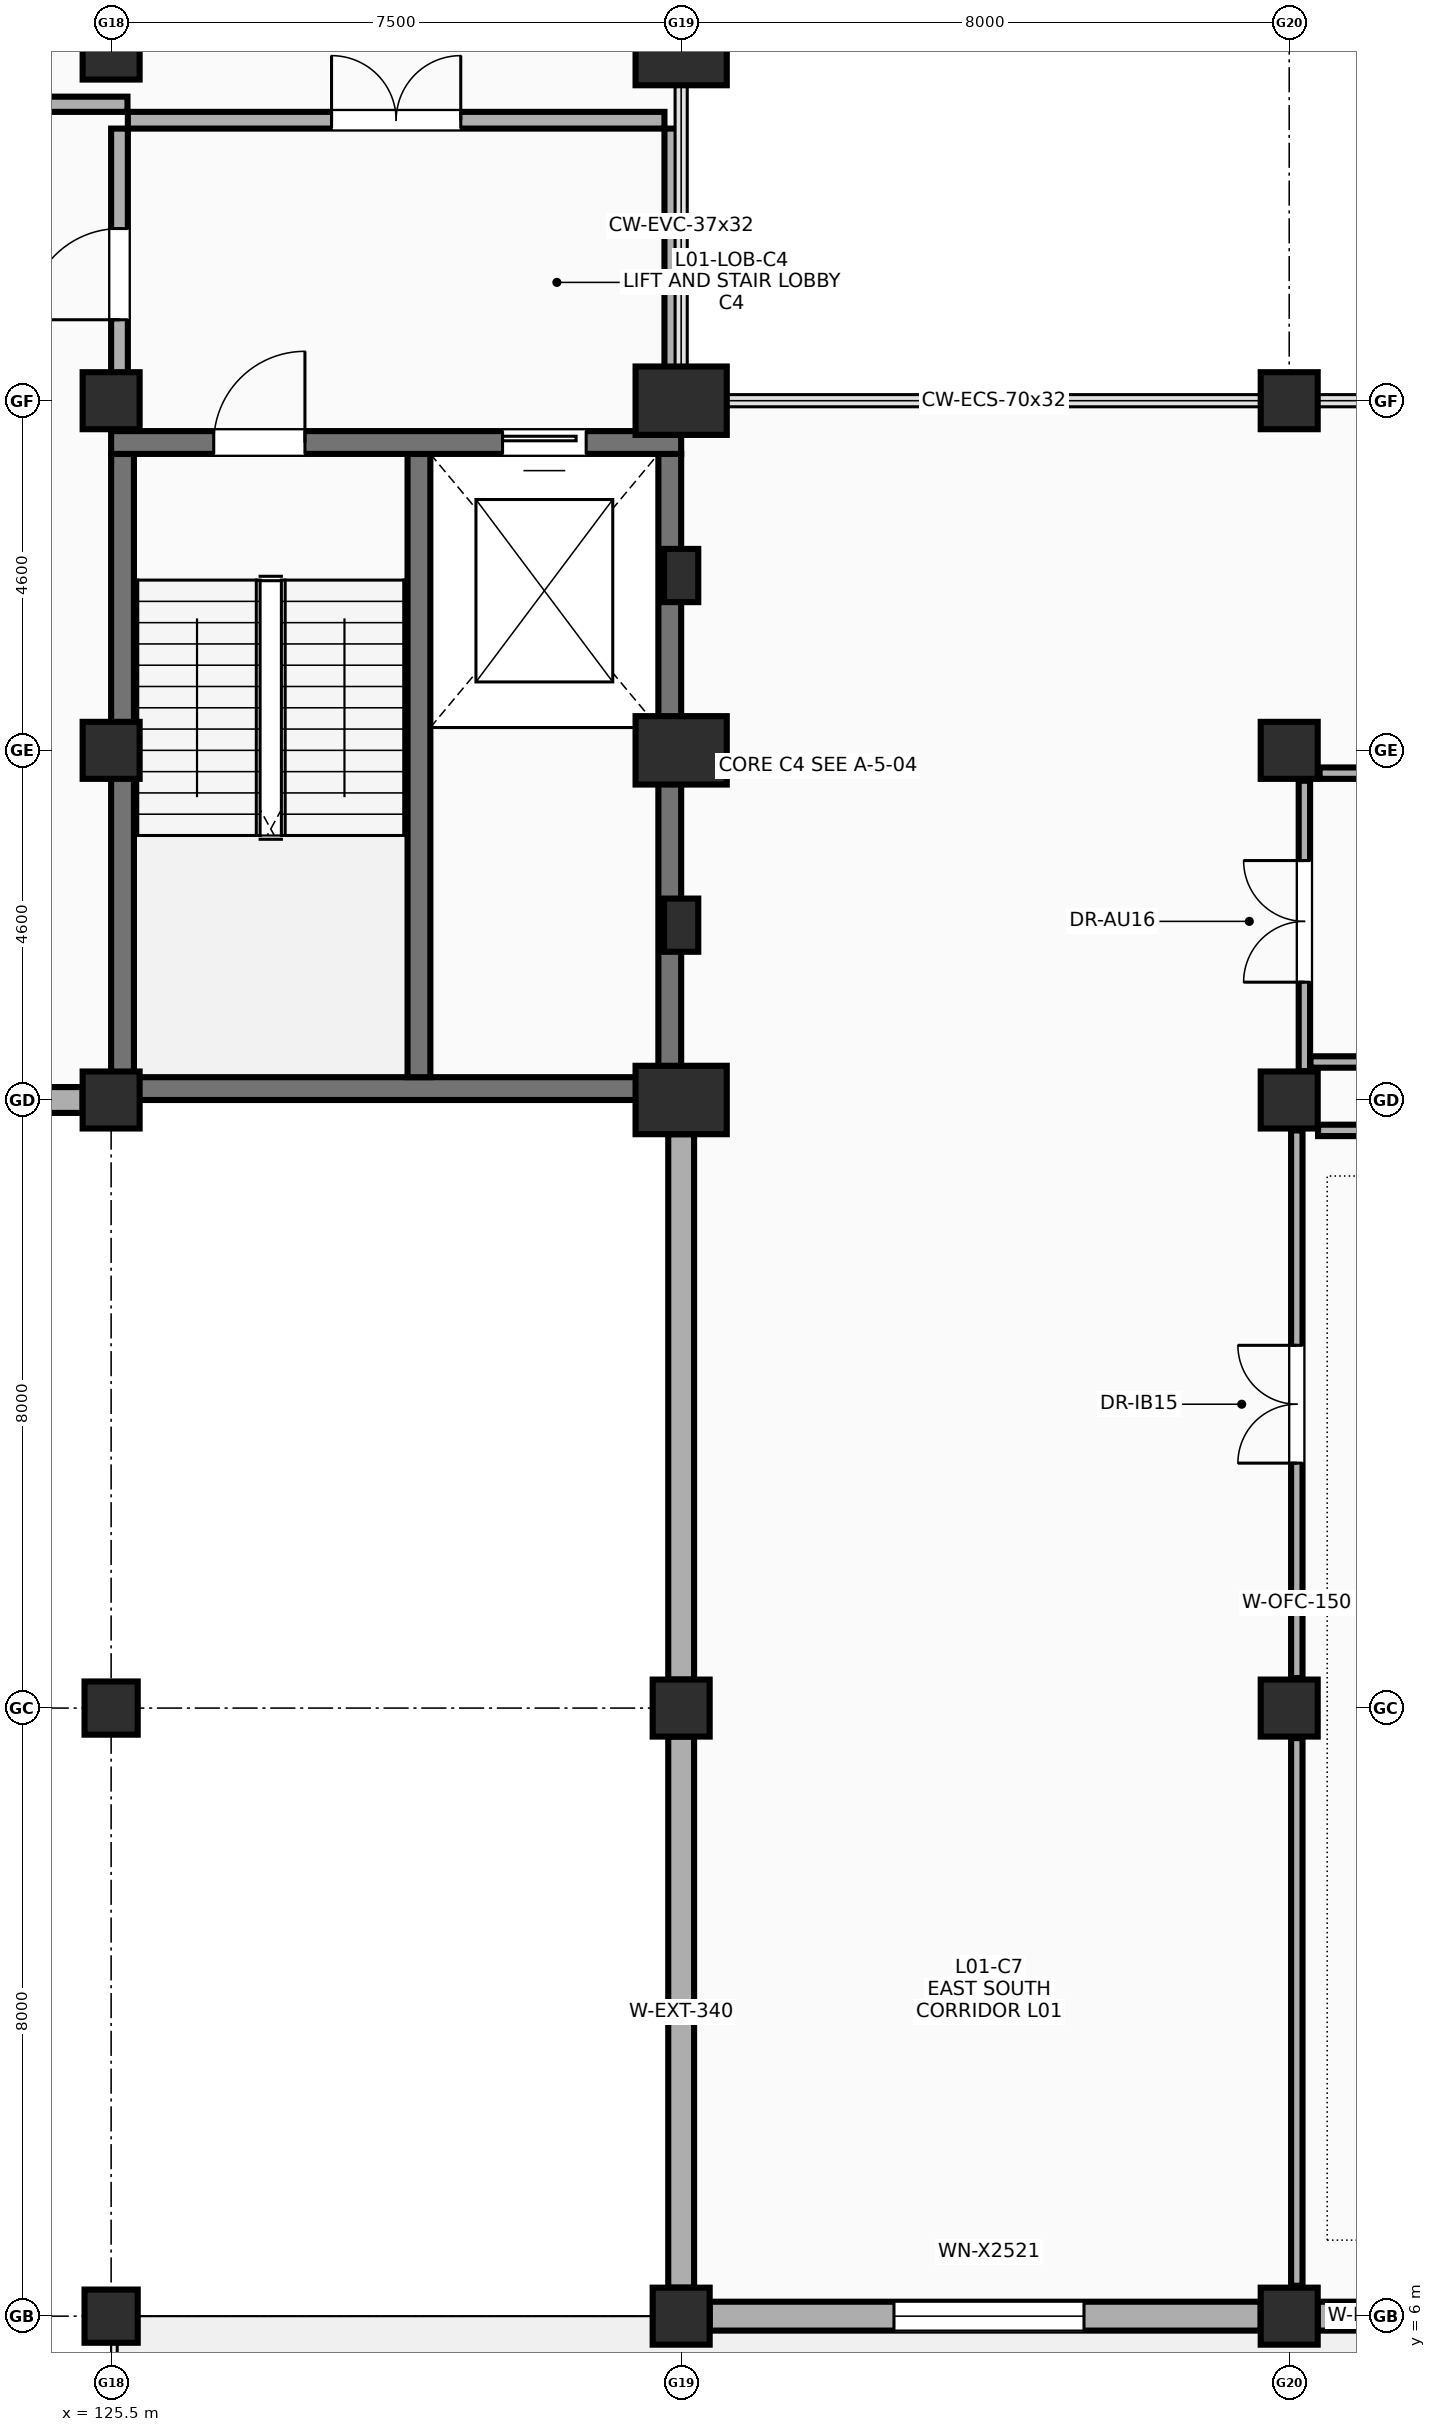
"""IFC4 building model, lengths in metres.
Left out: names, types, materials, properties, quantities, classifications, styles, units other than length and angle.
Written with IfcOpenShell. Run it as: python <this file> out.ifc"""

import sys

from ifc_helpers import new_model, si_unit, direction, frame, frame_2d, origin, origin_2d, place, context, subcontext, project, spatial, rectangle, circle, extrude, element, fill, save


model = new_model("IFC4")
c1 = context("Model", 3, precision=1e-05, world=origin(), true_north=direction((0.0, 1.0)))
c2 = subcontext(c1, "Body", "Model", "MODEL_VIEW")
j1 = project(units=[si_unit("LENGTHUNIT", "METRE"), si_unit("PLANEANGLEUNIT", "RADIAN")], contexts=[c1])
p1 = place(None, origin())
s1 = spatial("IfcSite", under=j1, at=p1, CompositionType="ELEMENT")
p2 = place(p1, origin())
s2 = spatial("IfcBuilding", under=s1, at=p2, CompositionType="ELEMENT")
p3 = place(p2, frame((0.0, 0.0, 5.4)))
s3 = spatial("IfcBuildingStorey", under=s2, at=p3, CompositionType="ELEMENT", Elevation=5.4)
for number, where, z_axis, x_axis in (
    (1, (125.5, 6.0, 0.0), (0.0, 0.0, 1.0), (1.0, 0.0, 0.0)),
    (2, (125.5, 14.0, 0.0), (0.0, 0.0, 1.0), (1.0, 0.0, 0.0)),
):
    element("IfcColumn", number, at=place(p3, frame(where, z_axis=z_axis, x_axis=x_axis)), inside=s3, PredefinedType="COLUMN", context=c2, shape_type="SweptSolid", body=[
        extrude(circle(Radius=0.35, at=origin_2d()), origin(), (0.0, 0.0, 1.0), 4.4),
    ])
for number, where, z_axis, x_axis in (
    (3, (125.5, 22.0, 0.0), (0.0, 0.0, 1.0), (1.0, 0.0, 0.0)),
    (4, (125.5, 26.6, 0.0), (0.0, 0.0, 1.0), (1.0, 0.0, 0.0)),
    (5, (125.5, 31.2, 0.0), (0.0, 0.0, 1.0), (1.0, 0.0, 0.0)),
    (6, (125.5, 35.8, 0.0), (0.0, 0.0, 1.0), (1.0, 0.0, 0.0)),
    (7, (133.0, 6.0, 0.0), (0.0, 0.0, 1.0), (1.0, 0.0, 0.0)),
    (8, (133.0, 14.0, 0.0), (0.0, 0.0, 1.0), (1.0, 0.0, 0.0)),
):
    element("IfcColumn", number, at=place(p3, frame(where, z_axis=z_axis, x_axis=x_axis)), inside=s3, PredefinedType="COLUMN", context=c2, shape_type="SweptSolid", body=[
        extrude(rectangle(XDim=0.75, YDim=0.75, at=origin_2d()), origin(), (0.0, 0.0, 1.0), 4.4),
    ])
for number, where, z_axis, x_axis in (
    (9, (133.0, 22.0, 0.0), (0.0, 0.0, 1.0), (1.0, 0.0, 0.0)),
    (10, (133.0, 26.6, 0.0), (0.0, 0.0, 1.0), (1.0, 0.0, 0.0)),
    (11, (133.0, 31.2, 0.0), (0.0, 0.0, 1.0), (1.0, 0.0, 0.0)),
    (12, (133.0, 35.8, 0.0), (0.0, 0.0, 1.0), (1.0, 0.0, 0.0)),
):
    element("IfcColumn", number, at=place(p3, frame(where, z_axis=z_axis, x_axis=x_axis)), inside=s3, PredefinedType="COLUMN", context=c2, shape_type="SweptSolid", body=[
        extrude(rectangle(XDim=1.2, YDim=0.9, at=origin_2d()), origin(), (0.0, 0.0, 1.0), 4.4),
    ])
for number, where, z_axis, x_axis in (
    (13, (141.0, 6.0, 0.0), (0.0, 0.0, 1.0), (1.0, 0.0, 0.0)),
    (14, (141.0, 14.0, 0.0), (0.0, 0.0, 1.0), (1.0, 0.0, 0.0)),
    (15, (141.0, 22.0, 0.0), (0.0, 0.0, 1.0), (1.0, 0.0, 0.0)),
    (16, (141.0, 26.6, 0.0), (0.0, 0.0, 1.0), (1.0, 0.0, 0.0)),
    (17, (141.0, 31.2, 0.0), (0.0, 0.0, 1.0), (1.0, 0.0, 0.0)),
):
    element("IfcColumn", number, at=place(p3, frame(where, z_axis=z_axis, x_axis=x_axis)), inside=s3, PredefinedType="COLUMN", context=c2, shape_type="SweptSolid", body=[
        extrude(rectangle(XDim=0.75, YDim=0.75, at=origin_2d()), origin(), (0.0, 0.0, 1.0), 4.4),
    ])
for number, where, z_axis, x_axis in (
    (18, (133.0, 24.3, 0.0), (0.0, 0.0, 1.0), (1.0, 0.0, 0.0)),
    (19, (133.0, 28.9, 0.0), (0.0, 0.0, 1.0), (1.0, 0.0, 0.0)),
):
    element("IfcColumn", number, at=place(p3, frame(where, z_axis=z_axis, x_axis=x_axis)), inside=s3, PredefinedType="PILASTER", context=c2, shape_type="SweptSolid", body=[
        extrude(rectangle(XDim=0.45, YDim=0.7, at=origin_2d()), origin(), (0.0, 0.0, 1.0), 4.4),
    ])
p4 = place(p3, frame((125.5, 22.15, 0.0), z_axis=(0.0, 0.0, 1.0), x_axis=(1.0, 0.0, 0.0)))
e20 = element("IfcWall", 20, at=p4, inside=s3, PredefinedType="SHEAR", context=c2, shape_type="SweptSolid", body=[
    extrude(rectangle(XDim=7.5, YDim=0.3, at=frame_2d((3.75, 0.0))), origin(), (0.0, 0.0, 1.0), 4.4),
])
for number, where, z_axis, x_axis in (
    (21, (125.65, 22.3, 0.0), (0.0, 0.0, 1.0), (0.0, 1.0, 0.0)),
    (22, (132.85, 22.3, 0.0), (0.0, 0.0, 1.0), (0.0, 1.0, 0.0)),
    (23, (129.55, 22.3, 0.0), (0.0, 0.0, 1.0), (0.0, 1.0, 0.0)),
):
    element("IfcWall", number, at=place(p3, frame(where, z_axis=z_axis, x_axis=x_axis)), inside=s3, PredefinedType="SHEAR", context=c2, shape_type="SweptSolid", body=[
        extrude(rectangle(XDim=8.2, YDim=0.3, at=frame_2d((4.1, 0.0))), origin(), (0.0, 0.0, 1.0), 4.4),
    ])
p5 = place(p3, frame((133.375, 6.0, 0.0), z_axis=(0.0, 0.0, 1.0), x_axis=(1.0, 0.0, 0.0)))
e24 = element("IfcWall", 24, at=p5, inside=s3, PredefinedType="SOLIDWALL", context=c2, shape_type="SweptSolid", body=[
    extrude(rectangle(XDim=7.25, YDim=0.38, at=frame_2d((3.625, 0.0))), origin(), (0.0, 0.0, 1.0), 3.2),
])
p6 = place(p5, frame((2.425, 0.0, 0.85)))
e25 = element("IfcOpeningElement", 25, at=p6, cuts=e24, PredefinedType="OPENING", context=c2, shape_type="SweptSolid", body=[
    extrude(rectangle(XDim=2.5, YDim=2.1, at=frame_2d((1.25, 1.05))), frame((0.0, 0.2, 0.0), z_axis=(0.0, -1.0, 0.0), x_axis=(1.0, 0.0, 0.0)), (0.0, 0.0, 1.0), 0.4),
])
p7 = place(p3, frame((141.375, 6.0, 0.0), z_axis=(0.0, 0.0, 1.0), x_axis=(1.0, 0.0, 0.0)))
e26 = element("IfcWall", 26, at=p7, inside=s3, PredefinedType="SOLIDWALL", context=c2, shape_type="SweptSolid", body=[
    extrude(rectangle(XDim=7.75, YDim=0.38, at=frame_2d((3.875, 0.0))), origin(), (0.0, 0.0, 1.0), 3.2),
])
p8 = place(p7, frame((4.675, 0.0, 0.0), z_axis=(0.0, 0.0, 1.0), x_axis=(-1.0, 0.0, 0.0)))
e27 = element("IfcOpeningElement", 27, at=p8, cuts=e26, PredefinedType="OPENING", context=c2, shape_type="SweptSolid", body=[
    extrude(rectangle(XDim=1.6, YDim=2.3, at=frame_2d((0.8, 1.15))), frame((0.0, 0.2, 0.0), z_axis=(0.0, -1.0, 0.0), x_axis=(1.0, 0.0, 0.0)), (0.0, 0.0, 1.0), 0.4),
])
p9 = place(p3, frame((133.0, 6.375, 0.0), z_axis=(0.0, 0.0, 1.0), x_axis=(0.0, 1.0, 0.0)))
e28 = element("IfcWall", 28, at=p9, inside=s3, PredefinedType="SOLIDWALL", context=c2, shape_type="SweptSolid", body=[
    extrude(rectangle(XDim=7.25, YDim=0.34, at=frame_2d((3.625, 0.0))), origin(), (0.0, 0.0, 1.0), 3.2),
])
p10 = place(p3, frame((133.0, 14.375, 0.0), z_axis=(0.0, 0.0, 1.0), x_axis=(0.0, 1.0, 0.0)))
e29 = element("IfcWall", 29, at=p10, inside=s3, PredefinedType="SOLIDWALL", context=c2, shape_type="SweptSolid", body=[
    extrude(rectangle(XDim=7.175, YDim=0.34, at=frame_2d((3.587, 0.0))), origin(), (0.0, 0.0, 1.0), 3.2),
])
p11 = place(p3, frame((125.5, 30.65, 0.0), z_axis=(0.0, 0.0, 1.0), x_axis=(1.0, 0.0, 0.0)))
e30 = element("IfcWall", 30, at=p11, inside=s3, PredefinedType="SHEAR", context=c2, shape_type="SweptSolid", body=[
    extrude(rectangle(XDim=7.5, YDim=0.3, at=frame_2d((3.75, 0.0))), origin(), (0.0, 0.0, 1.0), 4.4),
])
p12 = place(p11, frame((1.35, 0.0, 0.0)))
e31 = element("IfcOpeningElement", 31, at=p12, cuts=e30, PredefinedType="OPENING", context=c2, shape_type="SweptSolid", body=[
    extrude(rectangle(XDim=1.2, YDim=2.15, at=frame_2d((0.6, 1.075))), frame((0.0, 0.16, 0.0), z_axis=(0.0, -1.0, 0.0), x_axis=(1.0, 0.0, 0.0)), (0.0, 0.0, 1.0), 0.32),
])
p13 = place(p11, frame((5.15, 0.0, 0.0)))
e32 = element("IfcOpeningElement", 32, at=p13, cuts=e30, PredefinedType="OPENING", context=c2, shape_type="SweptSolid", body=[
    extrude(rectangle(XDim=1.1, YDim=2.15, at=frame_2d((0.55, 1.075))), frame((0.0, 0.16, 0.0), z_axis=(0.0, -1.0, 0.0), x_axis=(1.0, 0.0, 0.0)), (0.0, 0.0, 1.0), 0.32),
])
p14 = place(p3, frame((125.72, 34.89, 0.0), z_axis=(0.0, 0.0, 1.0), x_axis=(1.0, 0.0, 0.0)))
e33 = element("IfcWall", 33, at=p14, inside=s3, PredefinedType="SOLIDWALL", context=c2, shape_type="SweptSolid", body=[
    extrude(rectangle(XDim=7.06, YDim=0.22, at=frame_2d((3.53, 0.0))), origin(), (0.0, 0.0, 1.0), 3.5),
])
p15 = place(p14, frame((2.68, 0.0, 0.0)))
e34 = element("IfcOpeningElement", 34, at=p15, cuts=e33, PredefinedType="OPENING", context=c2, shape_type="SweptSolid", body=[
    extrude(rectangle(XDim=1.7, YDim=2.18, at=frame_2d((0.85, 1.09))), frame((0.0, 0.12, 0.0), z_axis=(0.0, -1.0, 0.0), x_axis=(1.0, 0.0, 0.0)), (0.0, 0.0, 1.0), 0.24),
])
p16 = place(p3, frame((125.61, 30.95, 0.0), z_axis=(0.0, 0.0, 1.0), x_axis=(0.0, 1.0, 0.0)))
e35 = element("IfcWall", 35, at=p16, inside=s3, PredefinedType="SOLIDWALL", context=c2, shape_type="SweptSolid", body=[
    extrude(rectangle(XDim=3.83, YDim=0.22, at=frame_2d((1.915, 0.0))), origin(), (0.0, 0.0, 1.0), 3.3),
])
p17 = place(p16, frame((1.315, 0.0, 0.0)))
e36 = element("IfcOpeningElement", 36, at=p17, cuts=e35, PredefinedType="OPENING", context=c2, shape_type="SweptSolid", body=[
    extrude(rectangle(XDim=1.2, YDim=2.15, at=frame_2d((0.6, 1.075))), frame((0.0, 0.12, 0.0), z_axis=(0.0, -1.0, 0.0), x_axis=(1.0, 0.0, 0.0)), (0.0, 0.0, 1.0), 0.24),
])
p18 = place(p3, frame((132.89, 30.95, 0.0), z_axis=(0.0, 0.0, 1.0), x_axis=(0.0, 1.0, 0.0)))
e37 = element("IfcWall", 37, at=p18, inside=s3, PredefinedType="SOLIDWALL", context=c2, shape_type="SweptSolid", body=[
    extrude(rectangle(XDim=3.83, YDim=0.22, at=frame_2d((1.915, 0.0))), origin(), (0.0, 0.0, 1.0), 3.5),
])
p19 = place(p3, frame((103.215, 35.1, 0.0), z_axis=(0.0, 0.0, 1.0), x_axis=(1.0, 0.0, 0.0)))
e38 = element("IfcWall", 38, at=p19, inside=s3, PredefinedType="PARTITIONING", context=c2, shape_type="SweptSolid", body=[
    extrude(rectangle(XDim=22.5, YDim=0.2, at=frame_2d((11.25, 0.0))), origin(), (0.0, 0.0, 1.0), 3.5),
])
p20 = place(p19, frame((10.62, 0.0, 0.0)))
e39 = element("IfcOpeningElement", 39, at=p20, cuts=e38, PredefinedType="OPENING", context=c2, shape_type="SweptSolid", body=[
    extrude(rectangle(XDim=1.6, YDim=2.18, at=frame_2d((0.8, 1.09))), frame((0.0, 0.11, 0.0), z_axis=(0.0, -1.0, 0.0), x_axis=(1.0, 0.0, 0.0)), (0.0, 0.0, 1.0), 0.22),
])
p21 = place(p3, frame((141.1, 14.395, 0.0), z_axis=(0.0, 0.0, 1.0), x_axis=(0.0, 1.0, 0.0)))
e40 = element("IfcWall", 40, at=p21, inside=s3, PredefinedType="PARTITIONING", context=c2, shape_type="SweptSolid", body=[
    extrude(rectangle(XDim=7.205, YDim=0.15, at=frame_2d((3.603, 0.0))), origin(), (0.0, 0.0, 1.0), 3.3),
])
p22 = place(p21, frame((2.827, 0.0, 0.0)))
e41 = element("IfcOpeningElement", 41, at=p22, cuts=e40, PredefinedType="OPENING", context=c2, shape_type="SweptSolid", body=[
    extrude(rectangle(XDim=1.55, YDim=2.25, at=frame_2d((0.775, 1.125))), frame((0.0, 0.085, 0.0), z_axis=(0.0, -1.0, 0.0), x_axis=(1.0, 0.0, 0.0)), (0.0, 0.0, 1.0), 0.17),
])
p23 = place(p3, frame((141.1, 6.4, 0.0), z_axis=(0.0, 0.0, 1.0), x_axis=(0.0, 1.0, 0.0)))
e42 = element("IfcWall", 42, at=p23, inside=s3, PredefinedType="PARTITIONING", context=c2, shape_type="SweptSolid", body=[
    extrude(rectangle(XDim=7.205, YDim=0.15, at=frame_2d((3.603, 0.0))), origin(), (0.0, 0.0, 1.0), 3.33),
])
p24 = place(p3, frame((141.4, 26.3, 0.0), z_axis=(0.0, 0.0, 1.0), x_axis=(1.0, 0.0, 0.0)))
e43 = element("IfcWall", 43, at=p24, inside=s3, PredefinedType="PARTITIONING", context=c2, shape_type="SweptSolid", body=[
    extrude(rectangle(XDim=7.72, YDim=0.15, at=frame_2d((3.86, 0.0))), origin(), (0.0, 0.0, 1.0), 3.3),
])
p25 = place(p24, frame((3.0, 0.0, 0.0)))
e44 = element("IfcOpeningElement", 44, at=p25, cuts=e43, PredefinedType="OPENING", context=c2, shape_type="SweptSolid", body=[
    extrude(rectangle(XDim=1.6, YDim=2.25, at=frame_2d((0.8, 1.125))), frame((0.0, 0.085, 0.0), z_axis=(0.0, -1.0, 0.0), x_axis=(1.0, 0.0, 0.0)), (0.0, 0.0, 1.0), 0.17),
])
p26 = place(p3, frame((141.2, 22.38, 0.0), z_axis=(0.0, 0.0, 1.0), x_axis=(0.0, 1.0, 0.0)))
e45 = element("IfcWall", 45, at=p26, inside=s3, PredefinedType="PARTITIONING", context=c2, shape_type="SweptSolid", body=[
    extrude(rectangle(XDim=3.82, YDim=0.15, at=frame_2d((1.91, 0.0))), origin(), (0.0, 0.0, 1.0), 3.5),
])
p27 = place(p26, frame((1.17, 0.0, 0.0)))
e46 = element("IfcOpeningElement", 46, at=p27, cuts=e45, PredefinedType="OPENING", context=c2, shape_type="SweptSolid", body=[
    extrude(rectangle(XDim=1.6, YDim=2.25, at=frame_2d((0.8, 1.125))), frame((0.0, 0.085, 0.0), z_axis=(0.0, -1.0, 0.0), x_axis=(1.0, 0.0, 0.0)), (0.0, 0.0, 1.0), 0.17),
])
p28 = place(p3, frame((141.38, 21.6, 0.0), z_axis=(0.0, 0.0, 1.0), x_axis=(1.0, 0.0, 0.0)))
e47 = element("IfcWall", 47, at=p28, inside=s3, PredefinedType="PARTITIONING", context=c2, shape_type="SweptSolid", body=[
    extrude(rectangle(XDim=7.74, YDim=0.15, at=frame_2d((3.87, 0.0))), origin(), (0.0, 0.0, 1.0), 4.02),
])
p29 = place(p3, frame((141.28, 22.5, 0.0), z_axis=(0.0, 0.0, 1.0), x_axis=(1.0, 0.0, 0.0)))
e48 = element("IfcWall", 48, at=p29, inside=s3, PredefinedType="PARTITIONING", context=c2, shape_type="SweptSolid", body=[
    extrude(rectangle(XDim=7.66, YDim=0.15, at=frame_2d((3.83, 0.0))), origin(), (0.0, 0.0, 1.0), 3.5),
])
p30 = place(p3, frame((124.22, 22.0, 0.0), z_axis=(0.0, 0.0, 1.0), x_axis=(1.0, 0.0, 0.0)))
e49 = element("IfcWall", 49, at=p30, inside=s3, PredefinedType="SOLIDWALL", context=c2, shape_type="SweptSolid", body=[
    extrude(rectangle(XDim=0.905, YDim=0.34, at=frame_2d((0.453, 0.0))), origin(), (0.0, 0.0, 1.0), 3.2),
])
p31 = place(p6, origin())
e50 = element("IfcWindow", 50, at=p31, inside=s3, PartitioningType="SINGLE_PANEL", PredefinedType="WINDOW", context=c2, shape_type="SweptSolid", body=[
    extrude(rectangle(XDim=2.5, YDim=2.1, at=frame_2d((1.25, 1.05))), frame((0.0, 0.03, 0.0), z_axis=(0.0, -1.0, 0.0), x_axis=(1.0, 0.0, 0.0)), (0.0, 0.0, 1.0), 0.06),
])
fill(e25, e50)
p32 = place(p12, origin())
e51 = element("IfcDoor", 51, at=p32, inside=s3, OperationType="SINGLE_SWING_RIGHT", PredefinedType="DOOR", context=c2, shape_type="SweptSolid", body=[
    extrude(rectangle(XDim=1.2, YDim=2.15, at=frame_2d((0.6, 1.075))), frame((0.0, 0.025, 0.0), z_axis=(0.0, -1.0, 0.0), x_axis=(1.0, 0.0, 0.0)), (0.0, 0.0, 1.0), 0.05),
])
fill(e31, e51)
p33 = place(p13, origin())
e52 = element("IfcDoor", 52, at=p33, inside=s3, OperationType="SLIDING_TO_LEFT", PredefinedType="DOOR", context=c2, shape_type="SweptSolid", body=[
    extrude(rectangle(XDim=1.1, YDim=2.15, at=frame_2d((0.55, 1.075))), frame((0.0, 0.025, 0.0), z_axis=(0.0, -1.0, 0.0), x_axis=(1.0, 0.0, 0.0)), (0.0, 0.0, 1.0), 0.05),
])
fill(e32, e52)
p34 = place(p15, origin())
e53 = element("IfcDoor", 53, at=p34, inside=s3, OperationType="DOUBLE_DOOR_SINGLE_SWING", PredefinedType="DOOR", context=c2, shape_type="SweptSolid", body=[
    extrude(rectangle(XDim=1.7, YDim=2.18, at=frame_2d((0.85, 1.09))), frame((0.0, 0.025, 0.0), z_axis=(0.0, -1.0, 0.0), x_axis=(1.0, 0.0, 0.0)), (0.0, 0.0, 1.0), 0.05),
])
fill(e34, e53)
p35 = place(p17, origin())
e54 = element("IfcDoor", 54, at=p35, inside=s3, OperationType="SINGLE_SWING_LEFT", PredefinedType="DOOR", context=c2, shape_type="SweptSolid", body=[
    extrude(rectangle(XDim=1.2, YDim=2.15, at=frame_2d((0.6, 1.075))), frame((0.0, 0.025, 0.0), z_axis=(0.0, -1.0, 0.0), x_axis=(1.0, 0.0, 0.0)), (0.0, 0.0, 1.0), 0.05),
])
fill(e36, e54)
p36 = place(p22, origin())
e55 = element("IfcDoor", 55, at=p36, inside=s3, OperationType="DOUBLE_DOOR_SINGLE_SWING", PredefinedType="DOOR", context=c2, shape_type="SweptSolid", body=[
    extrude(rectangle(XDim=1.55, YDim=2.25, at=frame_2d((0.775, 1.125))), frame((0.0, 0.025, 0.0), z_axis=(0.0, -1.0, 0.0), x_axis=(1.0, 0.0, 0.0)), (0.0, 0.0, 1.0), 0.05),
])
fill(e41, e55)
p37 = place(p27, origin())
e56 = element("IfcDoor", 56, at=p37, inside=s3, OperationType="DOUBLE_DOOR_SINGLE_SWING", PredefinedType="DOOR", context=c2, shape_type="SweptSolid", body=[
    extrude(rectangle(XDim=1.6, YDim=2.25, at=frame_2d((0.8, 1.125))), frame((0.0, 0.025, 0.0), z_axis=(0.0, -1.0, 0.0), x_axis=(1.0, 0.0, 0.0)), (0.0, 0.0, 1.0), 0.05),
])
fill(e46, e56)
save(model, sys.argv[1])
